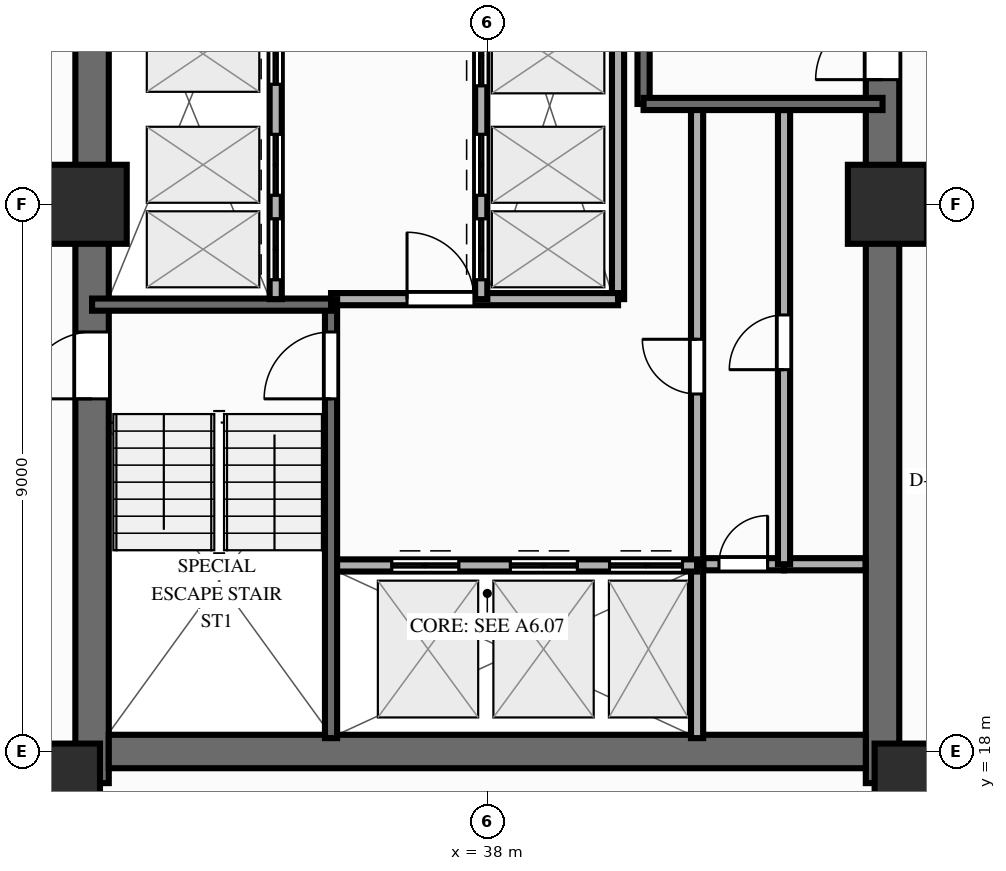
"""IFC4 building model, lengths in metres.
Left out: names, types, materials, properties, quantities, classifications, styles, units other than length and angle.
Written with IfcOpenShell. Run it as: python <this file> out.ifc"""

import sys

from ifc_helpers import new_model, si_unit, direction, frame, frame_2d, origin, origin_2d, place, context, subcontext, project, spatial, rectangle, extrude, source, transform, mapped, element, fill, save


model = new_model("IFC4")
c1 = context("Model", 3, precision=1e-05, world=origin(), true_north=direction((0.0, 1.0)))
c2 = subcontext(c1, "Body", "Model", "MODEL_VIEW")
j1 = project(units=[si_unit("LENGTHUNIT", "METRE"), si_unit("PLANEANGLEUNIT", "RADIAN")], contexts=[c1])
p1 = place(None, origin())
s1 = spatial("IfcSite", under=j1, at=p1, CompositionType="ELEMENT")
p2 = place(p1, origin())
s2 = spatial("IfcBuilding", under=s1, at=p2, CompositionType="ELEMENT")
p3 = place(p2, frame((0.0, 0.0, 89.85)))
s3 = spatial("IfcBuildingStorey", under=s2, at=p3, CompositionType="ELEMENT", Elevation=89.85)
p4 = place(p3, frame((31.5, 17.48, 0.0), z_axis=(0.0, 0.0, 1.0), x_axis=(0.0, 1.0, 0.0)))
e1 = element("IfcWall", 1, at=p4, inside=s3, PredefinedType="SHEAR", context=c2, shape_type="SweptSolid", body=[
    extrude(rectangle(XDim=19.04, YDim=0.55, at=frame_2d((9.52, 0.0))), origin(), (0.0, 0.0, 1.0), 3.0),
])
p5 = place(p4, frame((6.32, 0.0, 0.0)))
e2 = element("IfcOpeningElement", 2, at=p5, cuts=e1, PredefinedType="OPENING", context=c2, shape_type="SweptSolid", body=[
    extrude(rectangle(XDim=1.1, YDim=2.15, at=frame_2d((0.55, 1.075))), frame((0.0, 0.287, 0.0), z_axis=(0.0, -1.0, 0.0), x_axis=(1.0, 0.0, 0.0)), (0.0, 0.0, 1.0), 0.574),
])
p6 = place(p3, frame((44.5, 17.48, 0.0), z_axis=(0.0, 0.0, 1.0), x_axis=(0.0, 1.0, 0.0)))
e3 = element("IfcWall", 3, at=p6, inside=s3, PredefinedType="SHEAR", context=c2, shape_type="SweptSolid", body=[
    extrude(rectangle(XDim=19.04, YDim=0.55, at=frame_2d((9.52, 0.0))), origin(), (0.0, 0.0, 1.0), 3.0),
])
p7 = place(p6, frame((12.67, 0.0, 0.0), z_axis=(0.0, 0.0, 1.0), x_axis=(-1.0, 0.0, 0.0)))
e4 = element("IfcOpeningElement", 4, at=p7, cuts=e3, PredefinedType="OPENING", context=c2, shape_type="SweptSolid", body=[
    extrude(rectangle(XDim=1.1, YDim=2.15, at=frame_2d((0.55, 1.075))), frame((0.0, 0.287, 0.0), z_axis=(0.0, -1.0, 0.0), x_axis=(1.0, 0.0, 0.0)), (0.0, 0.0, 1.0), 0.574),
])
p8 = place(p3, frame((31.775, 18.0, 0.0), z_axis=(0.0, 0.0, 1.0), x_axis=(1.0, 0.0, 0.0)))
e5 = element("IfcWall", 5, at=p8, inside=s3, PredefinedType="SHEAR", context=c2, shape_type="SweptSolid", body=[
    extrude(rectangle(XDim=12.45, YDim=0.55, at=frame_2d((6.225, 0.0))), origin(), (0.0, 0.0, 1.0), 3.0),
])
m1 = source(origin(), c2, "Body", "SweptSolid", [
    extrude(rectangle(XDim=1.3, YDim=1.3, at=origin_2d()), origin(), (0.0, 0.0, 1.0), 3.0),
])
for number, where, z_axis, x_axis in (
    (6, (30.98, 17.48, 0.0), (0.0, 0.0, 1.0), (1.0, 0.0, 0.0)),
    (7, (45.02, 17.48, 0.0), (0.0, 0.0, 1.0), (1.0, 0.0, 0.0)),
    (8, (31.42, 27.0, 0.0), (0.0, 0.0, 1.0), (1.0, 0.0, 0.0)),
    (9, (44.58, 27.0, 0.0), (0.0, 0.0, 1.0), (1.0, 0.0, 0.0)),
):
    element("IfcColumn", number, at=place(p3, frame(where, z_axis=z_axis, x_axis=x_axis)), inside=s3, PredefinedType="COLUMN", context=c2, shape_type="MappedRepresentation", body=[
        mapped(m1, transform((0.0, 0.0, 0.0), scale=1.0)),
    ])
p9 = place(p3, frame((41.55, 21.08, 0.0), z_axis=(0.0, 0.0, 1.0), x_axis=(1.0, 0.0, 0.0)))
e10 = element("IfcWall", 10, at=p9, inside=s3, PredefinedType="PARTITIONING", context=c2, shape_type="SweptSolid", body=[
    extrude(rectangle(XDim=1.33, YDim=0.2, at=frame_2d((0.665, 0.0))), origin(), (0.0, 0.0, 1.0), 2.79),
])
p10 = place(p9, frame((0.26, 0.0, 0.0)))
e11 = element("IfcOpeningElement", 11, at=p10, cuts=e10, PredefinedType="OPENING", context=c2, shape_type="SweptSolid", body=[
    extrude(rectangle(XDim=0.8, YDim=2.05, at=frame_2d((0.4, 1.025))), frame((0.0, 0.112, 0.0), z_axis=(0.0, -1.0, 0.0), x_axis=(1.0, 0.0, 0.0)), (0.0, 0.0, 1.0), 0.224),
])
p11 = place(p3, frame((42.88, 21.08, 0.0), z_axis=(0.0, 0.0, 1.0), x_axis=(1.0, 0.0, 0.0)))
e12 = element("IfcWall", 12, at=p11, inside=s3, PredefinedType="PARTITIONING", context=c2, shape_type="SweptSolid", body=[
    extrude(rectangle(XDim=1.34, YDim=0.2, at=frame_2d((0.67, 0.0))), origin(), (0.0, 0.0, 1.0), 2.79),
])
p12 = place(p3, frame((42.88, 21.08, 0.0), z_axis=(0.0, 0.0, 1.0), x_axis=(0.0, 1.0, 0.0)))
e13 = element("IfcWall", 13, at=p12, inside=s3, PredefinedType="PARTITIONING", context=c2, shape_type="SweptSolid", body=[
    extrude(rectangle(XDim=7.47, YDim=0.2, at=frame_2d((3.735, 0.0))), origin(), (0.0, 0.0, 1.0), 2.79),
])
p13 = place(p12, frame((3.2, 0.0, 0.0)))
e14 = element("IfcOpeningElement", 14, at=p13, cuts=e13, PredefinedType="OPENING", context=c2, shape_type="SweptSolid", body=[
    extrude(rectangle(XDim=0.9, YDim=2.1, at=frame_2d((0.45, 1.05))), frame((0.0, 0.112, 0.0), z_axis=(0.0, -1.0, 0.0), x_axis=(1.0, 0.0, 0.0)), (0.0, 0.0, 1.0), 0.224),
])
p14 = place(p3, frame((41.45, 18.22, 0.0), z_axis=(0.0, 0.0, 1.0), x_axis=(0.0, 1.0, 0.0)))
e15 = element("IfcWall", 15, at=p14, inside=s3, PredefinedType="PARTITIONING", context=c2, shape_type="SweptSolid", body=[
    extrude(rectangle(XDim=2.86, YDim=0.2, at=frame_2d((1.43, 0.0))), origin(), (0.0, 0.0, 1.0), 2.79),
])
p15 = place(p3, frame((41.45, 21.08, 0.0), z_axis=(0.0, 0.0, 1.0), x_axis=(0.0, 1.0, 0.0)))
e16 = element("IfcWall", 16, at=p15, inside=s3, PredefinedType="PARTITIONING", context=c2, shape_type="SweptSolid", body=[
    extrude(rectangle(XDim=7.52, YDim=0.2, at=frame_2d((3.76, 0.0))), origin(), (0.0, 0.0, 1.0), 2.79),
])
p16 = place(p15, frame((2.8, 0.0, 0.0)))
e17 = element("IfcOpeningElement", 17, at=p16, cuts=e16, PredefinedType="OPENING", context=c2, shape_type="SweptSolid", body=[
    extrude(rectangle(XDim=0.9, YDim=2.1, at=frame_2d((0.45, 1.05))), frame((0.0, 0.112, 0.0), z_axis=(0.0, -1.0, 0.0), x_axis=(1.0, 0.0, 0.0)), (0.0, 0.0, 1.0), 0.224),
])
p17 = place(p3, frame((40.15, 25.44, 0.0), z_axis=(0.0, 0.0, 1.0), x_axis=(0.0, 1.0, 0.0)))
e18 = element("IfcWall", 18, at=p17, inside=s3, PredefinedType="PARTITIONING", context=c2, shape_type="SweptSolid", body=[
    extrude(rectangle(XDim=6.36, YDim=0.2, at=frame_2d((3.18, 0.0))), origin(), (0.0, 0.0, 1.0), 2.79),
])
p18 = place(p3, frame((35.43, 21.06, 0.0), z_axis=(0.0, 0.0, 1.0), x_axis=(1.0, 0.0, 0.0)))
e19 = element("IfcWall", 19, at=p18, inside=s3, PredefinedType="PARTITIONING", context=c2, shape_type="SweptSolid", body=[
    extrude(rectangle(XDim=6.02, YDim=0.2, at=frame_2d((3.01, 0.0))), origin(), (0.0, 0.0, 1.0), 2.79),
])
p19 = place(p18, frame((1.0, 0.0, 0.0)))
e20 = element("IfcOpeningElement", 20, at=p19, cuts=e19, PredefinedType="OPENING", context=c2, shape_type="SweptSolid", body=[
    extrude(rectangle(XDim=1.1, YDim=2.15, at=frame_2d((0.55, 1.075))), frame((0.0, 0.112, 0.0), z_axis=(0.0, -1.0, 0.0), x_axis=(1.0, 0.0, 0.0)), (0.0, 0.0, 1.0), 0.224),
])
p20 = place(p18, frame((2.95, 0.0, 0.0)))
e21 = element("IfcOpeningElement", 21, at=p20, cuts=e19, PredefinedType="OPENING", context=c2, shape_type="SweptSolid", body=[
    extrude(rectangle(XDim=1.1, YDim=2.15, at=frame_2d((0.55, 1.075))), frame((0.0, 0.112, 0.0), z_axis=(0.0, -1.0, 0.0), x_axis=(1.0, 0.0, 0.0)), (0.0, 0.0, 1.0), 0.224),
])
p21 = place(p18, frame((4.58, 0.0, 0.0)))
e22 = element("IfcOpeningElement", 22, at=p21, cuts=e19, PredefinedType="OPENING", context=c2, shape_type="SweptSolid", body=[
    extrude(rectangle(XDim=1.2, YDim=2.15, at=frame_2d((0.6, 1.075))), frame((0.0, 0.112, 0.0), z_axis=(0.0, -1.0, 0.0), x_axis=(1.0, 0.0, 0.0)), (0.0, 0.0, 1.0), 0.224),
])
p22 = place(p3, frame((35.43, 25.44, 0.0), z_axis=(0.0, 0.0, 1.0), x_axis=(1.0, 0.0, 0.0)))
e23 = element("IfcWall", 23, at=p22, inside=s3, PredefinedType="PARTITIONING", context=c2, shape_type="SweptSolid", body=[
    extrude(rectangle(XDim=4.72, YDim=0.2, at=frame_2d((2.36, 0.0))), origin(), (0.0, 0.0, 1.0), 2.79),
])
p23 = place(p22, frame((1.25, 0.0, 0.0)))
e24 = element("IfcOpeningElement", 24, at=p23, cuts=e23, PredefinedType="OPENING", context=c2, shape_type="SweptSolid", body=[
    extrude(rectangle(XDim=1.1, YDim=2.15, at=frame_2d((0.55, 1.075))), frame((0.0, 0.112, 0.0), z_axis=(0.0, -1.0, 0.0), x_axis=(1.0, 0.0, 0.0)), (0.0, 0.0, 1.0), 0.224),
])
p24 = place(p3, frame((35.43, 18.22, 0.0), z_axis=(0.0, 0.0, 1.0), x_axis=(0.0, 1.0, 0.0)))
e25 = element("IfcWall", 25, at=p24, inside=s3, PredefinedType="SOLIDWALL", context=c2, shape_type="SweptSolid", body=[
    extrude(rectangle(XDim=7.22, YDim=0.2, at=frame_2d((3.61, 0.0))), origin(), (0.0, 0.0, 1.0), 2.79),
])
p25 = place(p24, frame((6.68, 0.0, 0.0), z_axis=(0.0, 0.0, 1.0), x_axis=(-1.0, 0.0, 0.0)))
e26 = element("IfcOpeningElement", 26, at=p25, cuts=e25, PredefinedType="OPENING", context=c2, shape_type="SweptSolid", body=[
    extrude(rectangle(XDim=1.1, YDim=2.15, at=frame_2d((0.55, 1.075))), frame((0.0, 0.112, 0.0), z_axis=(0.0, -1.0, 0.0), x_axis=(1.0, 0.0, 0.0)), (0.0, 0.0, 1.0), 0.224),
])
p26 = place(p3, frame((31.5, 25.35, 0.0), z_axis=(0.0, 0.0, 1.0), x_axis=(1.0, 0.0, 0.0)))
e27 = element("IfcWall", 27, at=p26, inside=s3, PredefinedType="SOLIDWALL", context=c2, shape_type="SweptSolid", body=[
    extrude(rectangle(XDim=3.93, YDim=0.2, at=frame_2d((1.965, 0.0))), origin(), (0.0, 0.0, 1.0), 2.79),
])
p27 = place(p3, frame((40.57, 28.65, 0.0), z_axis=(0.0, 0.0, 1.0), x_axis=(0.0, 1.0, 0.0)))
e28 = element("IfcWall", 28, at=p27, inside=s3, PredefinedType="SOLIDWALL", context=c2, shape_type="SweptSolid", body=[
    extrude(rectangle(XDim=7.05, YDim=0.2, at=frame_2d((3.525, 0.0))), origin(), (0.0, 0.0, 1.0), 2.79),
])
p28 = place(p3, frame((40.57, 28.65, 0.0), z_axis=(0.0, 0.0, 1.0), x_axis=(1.0, 0.0, 0.0)))
e29 = element("IfcWall", 29, at=p28, inside=s3, PredefinedType="SOLIDWALL", context=c2, shape_type="SweptSolid", body=[
    extrude(rectangle(XDim=3.93, YDim=0.2, at=frame_2d((1.965, 0.0))), origin(), (0.0, 0.0, 1.0), 2.79),
])
p29 = place(p3, frame((34.52, 25.44, 0.0), z_axis=(0.0, 0.0, 1.0), x_axis=(0.0, 1.0, 0.0)))
e30 = element("IfcWall", 30, at=p29, inside=s3, PredefinedType="PARTITIONING", context=c2, shape_type="SweptSolid", body=[
    extrude(rectangle(XDim=10.34, YDim=0.2, at=frame_2d((5.17, 0.0))), origin(), (0.0, 0.0, 1.0), 2.79),
])
p30 = place(p29, frame((0.32, 0.0, 0.0)))
e31 = element("IfcOpeningElement", 31, at=p30, cuts=e30, PredefinedType="OPENING", context=c2, shape_type="SweptSolid", body=[
    extrude(rectangle(XDim=1.0, YDim=2.15, at=frame_2d((0.5, 1.075))), frame((0.0, 0.112, 0.0), z_axis=(0.0, -1.0, 0.0), x_axis=(1.0, 0.0, 0.0)), (0.0, 0.0, 1.0), 0.224),
])
p31 = place(p29, frame((1.71, 0.0, 0.0)))
e32 = element("IfcOpeningElement", 32, at=p31, cuts=e30, PredefinedType="OPENING", context=c2, shape_type="SweptSolid", body=[
    extrude(rectangle(XDim=1.0, YDim=2.15, at=frame_2d((0.5, 1.075))), frame((0.0, 0.112, 0.0), z_axis=(0.0, -1.0, 0.0), x_axis=(1.0, 0.0, 0.0)), (0.0, 0.0, 1.0), 0.224),
])
p32 = place(p29, frame((3.535, 0.0, 0.0)))
e33 = element("IfcOpeningElement", 33, at=p32, cuts=e30, PredefinedType="OPENING", context=c2, shape_type="SweptSolid", body=[
    extrude(rectangle(XDim=1.0, YDim=2.15, at=frame_2d((0.5, 1.075))), frame((0.0, 0.112, 0.0), z_axis=(0.0, -1.0, 0.0), x_axis=(1.0, 0.0, 0.0)), (0.0, 0.0, 1.0), 0.224),
])
p33 = place(p29, frame((5.135, 0.0, 0.0)))
e34 = element("IfcOpeningElement", 34, at=p33, cuts=e30, PredefinedType="OPENING", context=c2, shape_type="SweptSolid", body=[
    extrude(rectangle(XDim=1.0, YDim=2.15, at=frame_2d((0.5, 1.075))), frame((0.0, 0.112, 0.0), z_axis=(0.0, -1.0, 0.0), x_axis=(1.0, 0.0, 0.0)), (0.0, 0.0, 1.0), 0.224),
])
p34 = place(p29, frame((7.01, 0.0, 0.0)))
e35 = element("IfcOpeningElement", 35, at=p34, cuts=e30, PredefinedType="OPENING", context=c2, shape_type="SweptSolid", body=[
    extrude(rectangle(XDim=1.0, YDim=2.15, at=frame_2d((0.5, 1.075))), frame((0.0, 0.112, 0.0), z_axis=(0.0, -1.0, 0.0), x_axis=(1.0, 0.0, 0.0)), (0.0, 0.0, 1.0), 0.224),
])
p35 = place(p29, frame((8.76, 0.0, 0.0)))
e36 = element("IfcOpeningElement", 36, at=p35, cuts=e30, PredefinedType="OPENING", context=c2, shape_type="SweptSolid", body=[
    extrude(rectangle(XDim=1.0, YDim=2.15, at=frame_2d((0.5, 1.075))), frame((0.0, 0.112, 0.0), z_axis=(0.0, -1.0, 0.0), x_axis=(1.0, 0.0, 0.0)), (0.0, 0.0, 1.0), 0.224),
])
p36 = place(p3, frame((37.9, 25.44, 0.0), z_axis=(0.0, 0.0, 1.0), x_axis=(0.0, 1.0, 0.0)))
e37 = element("IfcWall", 37, at=p36, inside=s3, PredefinedType="PARTITIONING", context=c2, shape_type="SweptSolid", body=[
    extrude(rectangle(XDim=10.34, YDim=0.2, at=frame_2d((5.17, 0.0))), origin(), (0.0, 0.0, 1.0), 2.79),
])
p37 = place(p36, frame((0.32, 0.0, 0.0)))
e38 = element("IfcOpeningElement", 38, at=p37, cuts=e37, PredefinedType="OPENING", context=c2, shape_type="SweptSolid", body=[
    extrude(rectangle(XDim=1.0, YDim=2.15, at=frame_2d((0.5, 1.075))), frame((0.0, 0.112, 0.0), z_axis=(0.0, -1.0, 0.0), x_axis=(1.0, 0.0, 0.0)), (0.0, 0.0, 1.0), 0.224),
])
p38 = place(p36, frame((1.71, 0.0, 0.0)))
e39 = element("IfcOpeningElement", 39, at=p38, cuts=e37, PredefinedType="OPENING", context=c2, shape_type="SweptSolid", body=[
    extrude(rectangle(XDim=1.0, YDim=2.15, at=frame_2d((0.5, 1.075))), frame((0.0, 0.112, 0.0), z_axis=(0.0, -1.0, 0.0), x_axis=(1.0, 0.0, 0.0)), (0.0, 0.0, 1.0), 0.224),
])
p39 = place(p36, frame((3.51, 0.0, 0.0)))
e40 = element("IfcOpeningElement", 40, at=p39, cuts=e37, PredefinedType="OPENING", context=c2, shape_type="SweptSolid", body=[
    extrude(rectangle(XDim=1.0, YDim=2.15, at=frame_2d((0.5, 1.075))), frame((0.0, 0.112, 0.0), z_axis=(0.0, -1.0, 0.0), x_axis=(1.0, 0.0, 0.0)), (0.0, 0.0, 1.0), 0.224),
])
p40 = place(p36, frame((5.01, 0.0, 0.0)))
e41 = element("IfcOpeningElement", 41, at=p40, cuts=e37, PredefinedType="OPENING", context=c2, shape_type="SweptSolid", body=[
    extrude(rectangle(XDim=1.0, YDim=2.15, at=frame_2d((0.5, 1.075))), frame((0.0, 0.112, 0.0), z_axis=(0.0, -1.0, 0.0), x_axis=(1.0, 0.0, 0.0)), (0.0, 0.0, 1.0), 0.224),
])
p41 = place(p36, frame((6.86, 0.0, 0.0)))
e42 = element("IfcOpeningElement", 42, at=p41, cuts=e37, PredefinedType="OPENING", context=c2, shape_type="SweptSolid", body=[
    extrude(rectangle(XDim=1.0, YDim=2.15, at=frame_2d((0.5, 1.075))), frame((0.0, 0.112, 0.0), z_axis=(0.0, -1.0, 0.0), x_axis=(1.0, 0.0, 0.0)), (0.0, 0.0, 1.0), 0.224),
])
p42 = place(p36, frame((8.71, 0.0, 0.0)))
e43 = element("IfcOpeningElement", 43, at=p42, cuts=e37, PredefinedType="OPENING", context=c2, shape_type="SweptSolid", body=[
    extrude(rectangle(XDim=1.0, YDim=2.15, at=frame_2d((0.5, 1.075))), frame((0.0, 0.112, 0.0), z_axis=(0.0, -1.0, 0.0), x_axis=(1.0, 0.0, 0.0)), (0.0, 0.0, 1.0), 0.224),
])
m2 = source(origin(), c2, "Body", "SweptSolid", [
    extrude(rectangle(XDim=1.1, YDim=2.15, at=frame_2d((0.55, 1.075))), frame((0.0, 0.025, 0.0), z_axis=(0.0, -1.0, 0.0), x_axis=(1.0, 0.0, 0.0)), (0.0, 0.0, 1.0), 0.05),
])
p43 = place(p5, origin())
e44 = element("IfcDoor", 44, at=p43, inside=s3, OperationType="SINGLE_SWING_LEFT", PredefinedType="DOOR", context=c2, shape_type="MappedRepresentation", body=[
    mapped(m2, transform((0.0, 0.0, 0.0), scale=1.0)),
])
fill(e2, e44)
p44 = place(p7, origin())
e45 = element("IfcDoor", 45, at=p44, inside=s3, OperationType="SINGLE_SWING_RIGHT", PredefinedType="DOOR", context=c2, shape_type="MappedRepresentation", body=[
    mapped(m2, transform((0.0, 0.0, 0.0), scale=1.0)),
])
fill(e4, e45)
m3 = source(origin(), c2, "Body", "SweptSolid", [
    extrude(rectangle(XDim=0.8, YDim=2.05, at=frame_2d((0.4, 1.025))), frame((0.0, 0.025, 0.0), z_axis=(0.0, -1.0, 0.0), x_axis=(1.0, 0.0, 0.0)), (0.0, 0.0, 1.0), 0.05),
])
p45 = place(p10, origin())
e46 = element("IfcDoor", 46, at=p45, inside=s3, OperationType="SINGLE_SWING_RIGHT", PredefinedType="DOOR", context=c2, shape_type="MappedRepresentation", body=[
    mapped(m3, transform((0.0, 0.0, 0.0), scale=1.0)),
])
fill(e11, e46)
m4 = source(origin(), c2, "Body", "SweptSolid", [
    extrude(rectangle(XDim=0.9, YDim=2.1, at=frame_2d((0.45, 1.05))), frame((0.0, 0.025, 0.0), z_axis=(0.0, -1.0, 0.0), x_axis=(1.0, 0.0, 0.0)), (0.0, 0.0, 1.0), 0.05),
])
p46 = place(p13, origin())
e47 = element("IfcDoor", 47, at=p46, inside=s3, OperationType="SINGLE_SWING_LEFT", PredefinedType="DOOR", context=c2, shape_type="MappedRepresentation", body=[
    mapped(m4, transform((0.0, 0.0, 0.0), scale=1.0)),
])
fill(e14, e47)
p47 = place(p16, origin())
e48 = element("IfcDoor", 48, at=p47, inside=s3, OperationType="SINGLE_SWING_RIGHT", PredefinedType="DOOR", context=c2, shape_type="MappedRepresentation", body=[
    mapped(m4, transform((0.0, 0.0, 0.0), scale=1.0)),
])
fill(e17, e48)
p48 = place(p19, origin())
e49 = element("IfcDoor", 49, at=p48, inside=s3, OperationType="DOUBLE_DOOR_SLIDING", PredefinedType="DOOR", context=c2, shape_type="MappedRepresentation", body=[
    mapped(m2, transform((0.0, 0.0, 0.0), scale=1.0)),
])
fill(e20, e49)
p49 = place(p20, origin())
e50 = element("IfcDoor", 50, at=p49, inside=s3, OperationType="DOUBLE_DOOR_SLIDING", PredefinedType="DOOR", context=c2, shape_type="MappedRepresentation", body=[
    mapped(m2, transform((0.0, 0.0, 0.0), scale=1.0)),
])
fill(e21, e50)
m5 = source(origin(), c2, "Body", "SweptSolid", [
    extrude(rectangle(XDim=1.2, YDim=2.15, at=frame_2d((0.6, 1.075))), frame((0.0, 0.025, 0.0), z_axis=(0.0, -1.0, 0.0), x_axis=(1.0, 0.0, 0.0)), (0.0, 0.0, 1.0), 0.05),
])
p50 = place(p21, origin())
e51 = element("IfcDoor", 51, at=p50, inside=s3, OperationType="DOUBLE_DOOR_SLIDING", PredefinedType="DOOR", context=c2, shape_type="MappedRepresentation", body=[
    mapped(m5, transform((0.0, 0.0, 0.0), scale=1.0)),
])
fill(e22, e51)
p51 = place(p23, origin())
e52 = element("IfcDoor", 52, at=p51, inside=s3, OperationType="SINGLE_SWING_LEFT", PredefinedType="DOOR", context=c2, shape_type="MappedRepresentation", body=[
    mapped(m2, transform((0.0, 0.0, 0.0), scale=1.0)),
])
fill(e24, e52)
p52 = place(p25, origin())
e53 = element("IfcDoor", 53, at=p52, inside=s3, OperationType="SINGLE_SWING_RIGHT", PredefinedType="DOOR", context=c2, shape_type="MappedRepresentation", body=[
    mapped(m2, transform((0.0, 0.0, 0.0), scale=1.0)),
])
fill(e26, e53)
m6 = source(origin(), c2, "Body", "SweptSolid", [
    extrude(rectangle(XDim=1.0, YDim=2.15, at=frame_2d((0.5, 1.075))), frame((0.0, 0.025, 0.0), z_axis=(0.0, -1.0, 0.0), x_axis=(1.0, 0.0, 0.0)), (0.0, 0.0, 1.0), 0.05),
])
p53 = place(p30, origin())
e54 = element("IfcDoor", 54, at=p53, inside=s3, OperationType="DOUBLE_DOOR_SLIDING", PredefinedType="DOOR", context=c2, shape_type="MappedRepresentation", body=[
    mapped(m6, transform((0.0, 0.0, 0.0), scale=1.0)),
])
fill(e31, e54)
p54 = place(p31, origin())
e55 = element("IfcDoor", 55, at=p54, inside=s3, OperationType="DOUBLE_DOOR_SLIDING", PredefinedType="DOOR", context=c2, shape_type="MappedRepresentation", body=[
    mapped(m6, transform((0.0, 0.0, 0.0), scale=1.0)),
])
fill(e32, e55)
p55 = place(p32, origin())
e56 = element("IfcDoor", 56, at=p55, inside=s3, OperationType="DOUBLE_DOOR_SLIDING", PredefinedType="DOOR", context=c2, shape_type="MappedRepresentation", body=[
    mapped(m6, transform((0.0, 0.0, 0.0), scale=1.0)),
])
fill(e33, e56)
p56 = place(p37, origin())
e57 = element("IfcDoor", 57, at=p56, inside=s3, OperationType="DOUBLE_DOOR_SLIDING", PredefinedType="DOOR", context=c2, shape_type="MappedRepresentation", body=[
    mapped(m6, transform((0.0, 0.0, 0.0), scale=1.0)),
])
fill(e38, e57)
p57 = place(p38, origin())
e58 = element("IfcDoor", 58, at=p57, inside=s3, OperationType="DOUBLE_DOOR_SLIDING", PredefinedType="DOOR", context=c2, shape_type="MappedRepresentation", body=[
    mapped(m6, transform((0.0, 0.0, 0.0), scale=1.0)),
])
fill(e39, e58)
p58 = place(p39, origin())
e59 = element("IfcDoor", 59, at=p58, inside=s3, OperationType="DOUBLE_DOOR_SLIDING", PredefinedType="DOOR", context=c2, shape_type="MappedRepresentation", body=[
    mapped(m6, transform((0.0, 0.0, 0.0), scale=1.0)),
])
fill(e40, e59)
save(model, sys.argv[1])
